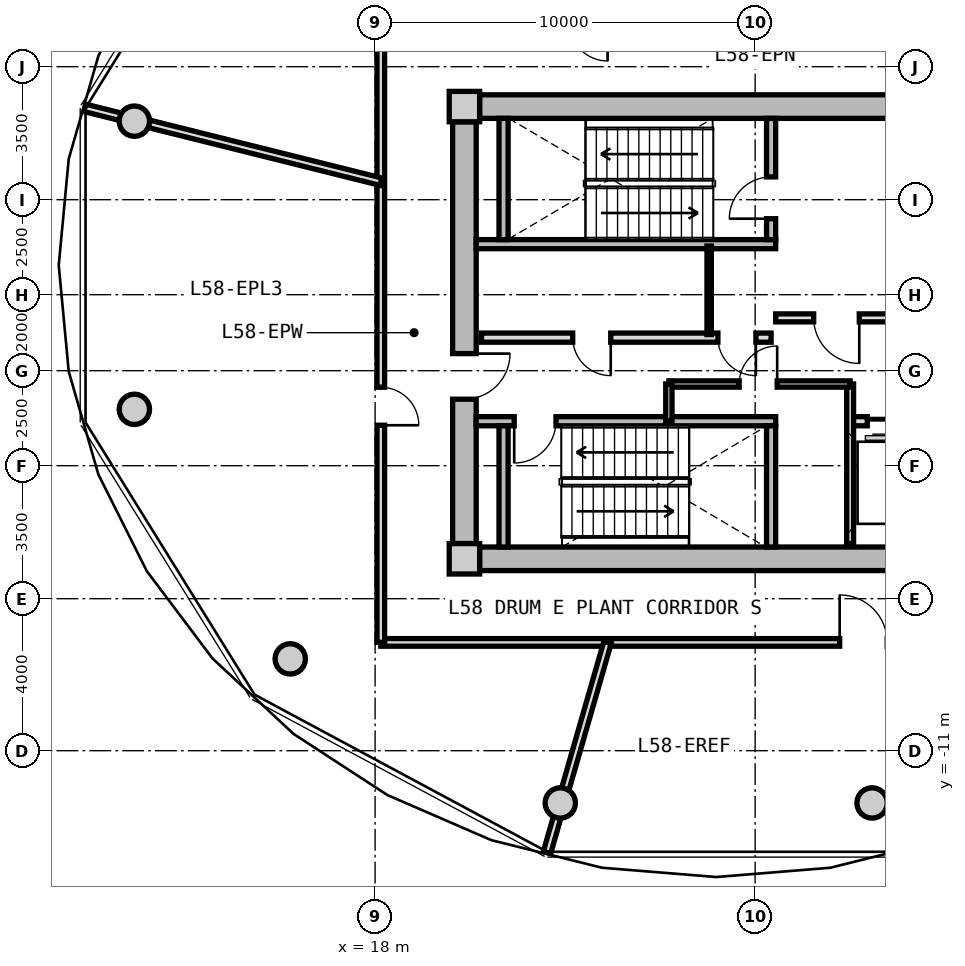
"""IFC4 building model, lengths in metres.
Left out: names, types, materials, properties, quantities, classifications, styles, units other than length and angle.
Written with IfcOpenShell. Run it as: python <this file> out.ifc"""

import sys

from ifc_helpers import new_model, si_unit, direction, frame, frame_2d, origin, origin_2d, place, context, subcontext, project, spatial, rectangle, circle, extrude, source, transform, mapped, element, fill, save


model = new_model("IFC4")
c1 = context("Model", 3, precision=1e-05, world=origin(), true_north=direction((0.0, 1.0)))
c2 = subcontext(c1, "Body", "Model", "MODEL_VIEW")
j1 = project(units=[si_unit("LENGTHUNIT", "METRE"), si_unit("PLANEANGLEUNIT", "RADIAN")], contexts=[c1])
p1 = place(None, origin())
s1 = spatial("IfcSite", under=j1, at=p1, CompositionType="ELEMENT")
p2 = place(p1, origin())
s2 = spatial("IfcBuilding", under=s1, at=p2, CompositionType="ELEMENT")
p3 = place(p2, frame((0.0, 0.0, 186.15)))
s3 = spatial("IfcBuildingStorey", under=s2, at=p3, CompositionType="ELEMENT", Elevation=186.15)
m1 = source(origin(), c2, "Body", "SweptSolid", [
    extrude(rectangle(XDim=0.8, YDim=0.8, at=origin_2d()), origin(), (0.0, 0.0, 1.0), 4.5),
])
for number, where, z_axis, x_axis in (
    (1, (20.35, -5.95, 0.0), (0.0, 0.0, 1.0), (1.0, 0.0, 0.0)),
    (2, (20.35, 5.95, 0.0), (0.0, 0.0, 1.0), (1.0, 0.0, 0.0)),
):
    element("IfcColumn", number, at=place(p3, frame(where, z_axis=z_axis, x_axis=x_axis)), inside=s3, PredefinedType="COLUMN", context=c2, shape_type="MappedRepresentation", body=[
        mapped(m1, transform((0.0, 0.0, 0.0), x_axis=(1.0, 0.0, 0.0), y_axis=(0.0, 1.0, 0.0), z_axis=(0.0, 0.0, 1.0), scale=1.0)),
    ])
m2 = source(origin(), c2, "Body", "SweptSolid", [
    extrude(rectangle(XDim=14.5, YDim=0.62, at=frame_2d((7.25, 0.0))), origin(), (0.0, 0.0, 1.0), 4.08),
])
for number, where, z_axis, x_axis in (
    (3, (20.75, 5.95, 0.0), (0.0, 0.0, 1.0), (1.0, 0.0, 0.0)),
    (4, (35.25, -5.95, 0.0), (0.0, 0.0, 1.0), (-1.0, 0.0, 0.0)),
):
    element("IfcWall", number, at=place(p3, frame(where, z_axis=z_axis, x_axis=x_axis)), inside=s3, PredefinedType="SHEAR", context=c2, shape_type="MappedRepresentation", body=[
        mapped(m2, transform((0.0, 0.0, 0.0), x_axis=(1.0, 0.0, 0.0), y_axis=(0.0, 1.0, 0.0), z_axis=(0.0, 0.0, 1.0), scale=1.0)),
    ])
m3 = source(origin(), c2, "Body", "SweptSolid", [
    extrude(rectangle(XDim=11.1, YDim=0.62, at=frame_2d((5.55, 0.0))), origin(), (0.0, 0.0, 1.0), 4.08),
])
p4 = place(p3, frame((20.35, -5.55, 0.0), z_axis=(0.0, 0.0, 1.0), x_axis=(0.0, 1.0, 0.0)))
e5 = element("IfcWall", 5, at=p4, inside=s3, PredefinedType="SHEAR", context=c2, shape_type="MappedRepresentation", body=[
    mapped(m3, transform((0.0, 0.0, 0.0), x_axis=(1.0, 0.0, 0.0), y_axis=(0.0, 1.0, 0.0), z_axis=(0.0, 0.0, 1.0), scale=1.0)),
])
p5 = place(p4, frame((3.8, 0.0, 0.0)))
e6 = element("IfcOpeningElement", 6, at=p5, cuts=e5, PredefinedType="OPENING", context=c2, shape_type="SweptSolid", body=[
    extrude(rectangle(XDim=1.2, YDim=2.15, at=frame_2d((0.6, 1.075))), frame((0.0, 0.32, 0.0), z_axis=(0.0, -1.0, 0.0), x_axis=(1.0, 0.0, 0.0)), (0.0, 0.0, 1.0), 0.64),
])
m4 = source(origin(), c2, "Body", "SweptSolid", [
    extrude(circle(Radius=0.4, at=origin_2d()), origin(), (0.0, 0.0, 1.0), 4.08),
])
for number, where, z_axis, x_axis in (
    (7, (11.665, 5.567, 0.0), (0.0, 0.0, 1.0), (1.0, 0.0, 0.0)),
    (8, (11.665, -2.016, 0.0), (0.0, 0.0, 1.0), (1.0, 0.0, 0.0)),
    (9, (15.767, -8.584, 0.0), (0.0, 0.0, 1.0), (1.0, 0.0, 0.0)),
    (10, (22.873, -12.375, 0.0), (0.0, 0.0, 1.0), (1.0, 0.0, 0.0)),
    (11, (31.077, -12.375, 0.0), (0.0, 0.0, 1.0), (1.0, 0.0, 0.0)),
):
    element("IfcColumn", number, at=place(p3, frame(where, z_axis=z_axis, x_axis=x_axis)), inside=s3, PredefinedType="COLUMN", context=c2, shape_type="MappedRepresentation", body=[
        mapped(m4, transform((0.0, 0.0, 0.0), x_axis=(1.0, 0.0, 0.0), y_axis=(0.0, 1.0, 0.0), z_axis=(0.0, 0.0, 1.0), scale=1.0)),
    ])
m5 = source(origin(), c2, "Body", "SweptSolid", [
    extrude(rectangle(XDim=7.88, YDim=0.24, at=frame_2d((3.94, 0.0))), origin(), (0.0, 0.0, 1.0), 4.08),
])
p6 = place(p3, frame((20.66, 2.33, 0.0), z_axis=(0.0, 0.0, 1.0), x_axis=(1.0, 0.0, 0.0)))
e12 = element("IfcWall", 12, at=p6, inside=s3, PredefinedType="PARTITIONING", context=c2, shape_type="MappedRepresentation", body=[
    mapped(m5, transform((0.0, 0.0, 0.0), x_axis=(1.0, 0.0, 0.0), y_axis=(0.0, 1.0, 0.0), z_axis=(0.0, 0.0, 1.0), scale=1.0)),
])
m6 = source(origin(), c2, "Body", "SweptSolid", [
    extrude(rectangle(XDim=3.19, YDim=0.24, at=frame_2d((1.595, 0.0))), origin(), (0.0, 0.0, 1.0), 4.08),
])
p7 = place(p3, frame((21.38, 2.45, 0.0), z_axis=(0.0, 0.0, 1.0), x_axis=(0.0, 1.0, 0.0)))
e13 = element("IfcWall", 13, at=p7, inside=s3, PredefinedType="PARTITIONING", context=c2, shape_type="MappedRepresentation", body=[
    mapped(m6, transform((0.0, 0.0, 0.0), x_axis=(1.0, 0.0, 0.0), y_axis=(0.0, 1.0, 0.0), z_axis=(0.0, 0.0, 1.0), scale=1.0)),
])
p8 = place(p3, frame((28.42, 2.45, 0.0), z_axis=(0.0, 0.0, 1.0), x_axis=(0.0, 1.0, 0.0)))
e14 = element("IfcWall", 14, at=p8, inside=s3, PredefinedType="PARTITIONING", context=c2, shape_type="MappedRepresentation", body=[
    mapped(m6, transform((0.0, 0.0, 0.0), x_axis=(1.0, 0.0, 0.0), y_axis=(0.0, 1.0, 0.0), z_axis=(0.0, 0.0, 1.0), scale=1.0)),
])
p9 = place(p8, frame((0.55, 0.0, 0.0)))
e15 = element("IfcOpeningElement", 15, at=p9, cuts=e14, PredefinedType="OPENING", context=c2, shape_type="SweptSolid", body=[
    extrude(rectangle(XDim=1.1, YDim=2.15, at=frame_2d((0.55, 1.075))), frame((0.0, 0.13, 0.0), z_axis=(0.0, -1.0, 0.0), x_axis=(1.0, 0.0, 0.0)), (0.0, 0.0, 1.0), 0.26),
])
p10 = place(p3, frame((20.66, -2.33, 0.0), z_axis=(0.0, 0.0, 1.0), x_axis=(1.0, 0.0, 0.0)))
e16 = element("IfcWall", 16, at=p10, inside=s3, PredefinedType="PARTITIONING", context=c2, shape_type="MappedRepresentation", body=[
    mapped(m5, transform((0.0, 0.0, 0.0), x_axis=(1.0, 0.0, 0.0), y_axis=(0.0, 1.0, 0.0), z_axis=(0.0, 0.0, 1.0), scale=1.0)),
])
p11 = place(p10, frame((1.0, 0.0, 0.0)))
e17 = element("IfcOpeningElement", 17, at=p11, cuts=e16, PredefinedType="OPENING", context=c2, shape_type="SweptSolid", body=[
    extrude(rectangle(XDim=1.1, YDim=2.15, at=frame_2d((0.55, 1.075))), frame((0.0, 0.13, 0.0), z_axis=(0.0, -1.0, 0.0), x_axis=(1.0, 0.0, 0.0)), (0.0, 0.0, 1.0), 0.26),
])
for number, where, z_axis, x_axis in (
    (18, (21.38, -5.64, 0.0), (0.0, 0.0, 1.0), (0.0, 1.0, 0.0)),
    (19, (28.42, -5.64, 0.0), (0.0, 0.0, 1.0), (0.0, 1.0, 0.0)),
):
    element("IfcWall", number, at=place(p3, frame(where, z_axis=z_axis, x_axis=x_axis)), inside=s3, PredefinedType="PARTITIONING", context=c2, shape_type="MappedRepresentation", body=[
        mapped(m6, transform((0.0, 0.0, 0.0), x_axis=(1.0, 0.0, 0.0), y_axis=(0.0, 1.0, 0.0), z_axis=(0.0, 0.0, 1.0), scale=1.0)),
    ])
m7 = source(origin(), c2, "Body", "SweptSolid", [
    extrude(rectangle(XDim=6.66, YDim=0.21, at=frame_2d((3.33, 0.0))), origin(), (0.0, 0.0, 1.0), 4.065),
])
p12 = place(p3, frame((28.54, 0.39, 0.0), z_axis=(0.0, 0.0, 1.0), x_axis=(1.0, 0.0, 0.0)))
e20 = element("IfcWall", 20, at=p12, inside=s3, PredefinedType="PARTITIONING", context=c2, shape_type="MappedRepresentation", body=[
    mapped(m7, transform((0.0, 0.0, 0.0), x_axis=(1.0, 0.0, 0.0), y_axis=(0.0, 1.0, 0.0), z_axis=(0.0, 0.0, 1.0), scale=1.0)),
])
p13 = place(p12, frame((1.0, 0.0, 0.0)))
e21 = element("IfcOpeningElement", 21, at=p13, cuts=e20, PredefinedType="OPENING", context=c2, shape_type="SweptSolid", body=[
    extrude(rectangle(XDim=1.2, YDim=2.15, at=frame_2d((0.6, 1.075))), frame((0.0, 0.115, 0.0), z_axis=(0.0, -1.0, 0.0), x_axis=(1.0, 0.0, 0.0)), (0.0, 0.0, 1.0), 0.23),
])
m8 = source(origin(), c2, "Body", "SweptSolid", [
    extrude(rectangle(XDim=7.62, YDim=0.24, at=frame_2d((3.81, 0.0))), origin(), (0.0, 0.0, 1.0), 4.065),
])
p14 = place(p3, frame((20.8, -0.13, 0.0), z_axis=(0.0, 0.0, 1.0), x_axis=(1.0, 0.0, 0.0)))
e22 = element("IfcWall", 22, at=p14, inside=s3, PredefinedType="PARTITIONING", context=c2, shape_type="MappedRepresentation", body=[
    mapped(m8, transform((0.0, 0.0, 0.0), x_axis=(1.0, 0.0, 0.0), y_axis=(0.0, 1.0, 0.0), z_axis=(0.0, 0.0, 1.0), scale=1.0)),
])
p15 = place(p14, frame((6.22, 0.0, 0.0)))
e23 = element("IfcOpeningElement", 23, at=p15, cuts=e22, PredefinedType="OPENING", context=c2, shape_type="SweptSolid", body=[
    extrude(rectangle(XDim=1.0, YDim=2.1, at=frame_2d((0.5, 1.05))), frame((0.0, 0.13, 0.0), z_axis=(0.0, -1.0, 0.0), x_axis=(1.0, 0.0, 0.0)), (0.0, 0.0, 1.0), 0.26),
])
p16 = place(p14, frame((2.4, 0.0, 0.0)))
e24 = element("IfcOpeningElement", 24, at=p16, cuts=e22, PredefinedType="OPENING", context=c2, shape_type="SweptSolid", body=[
    extrude(rectangle(XDim=1.0, YDim=2.1, at=frame_2d((0.5, 1.05))), frame((0.0, 0.13, 0.0), z_axis=(0.0, -1.0, 0.0), x_axis=(1.0, 0.0, 0.0)), (0.0, 0.0, 1.0), 0.26),
])
m9 = source(origin(), c2, "Body", "SweptSolid", [
    extrude(rectangle(XDim=2.33, YDim=0.115, at=frame_2d((1.165, 0.0))), origin(), (0.0, 0.0, 1.0), 4.065),
])
p17 = place(p3, frame((26.79, -0.05, 0.0), z_axis=(0.0, 0.0, 1.0), x_axis=(0.0, 1.0, 0.0)))
e25 = element("IfcWall", 25, at=p17, inside=s3, PredefinedType="PARTITIONING", context=c2, shape_type="MappedRepresentation", body=[
    mapped(m9, transform((0.0, 0.0, 0.0), x_axis=(1.0, 0.0, 0.0), y_axis=(0.0, 1.0, 0.0), z_axis=(0.0, 0.0, 1.0), scale=1.0)),
])
m10 = source(origin(), c2, "Body", "SweptSolid", [
    extrude(rectangle(XDim=2.05, YDim=0.24, at=frame_2d((1.025, 0.0))), origin(), (0.0, 0.0, 1.0), 4.065),
])
p18 = place(p3, frame((30.5, -2.33, 0.0), z_axis=(0.0, 0.0, 1.0), x_axis=(1.0, 0.0, 0.0)))
e26 = element("IfcWall", 26, at=p18, inside=s3, PredefinedType="PARTITIONING", context=c2, shape_type="MappedRepresentation", body=[
    mapped(m10, transform((0.0, 0.0, 0.0), x_axis=(1.0, 0.0, 0.0), y_axis=(0.0, 1.0, 0.0), z_axis=(0.0, 0.0, 1.0), scale=1.0)),
])
p19 = place(p18, frame((0.45, 0.0, 0.0)))
e27 = element("IfcOpeningElement", 27, at=p19, cuts=e26, PredefinedType="OPENING", context=c2, shape_type="SweptSolid", body=[
    extrude(rectangle(XDim=1.1, YDim=2.2, at=frame_2d((0.55, 1.1))), frame((0.0, 0.13, 0.0), z_axis=(0.0, -1.0, 0.0), x_axis=(1.0, 0.0, 0.0)), (0.0, 0.0, 1.0), 0.26),
])
m11 = source(origin(), c2, "Body", "SweptSolid", [
    extrude(rectangle(XDim=4.2, YDim=0.18, at=frame_2d((2.1, 0.0))), origin(), (0.0, 0.0, 1.0), 4.065),
])
p20 = place(p3, frame((30.5, -5.55, 0.0), z_axis=(0.0, 0.0, 1.0), x_axis=(0.0, 1.0, 0.0)))
e28 = element("IfcWall", 28, at=p20, inside=s3, PredefinedType="PARTITIONING", context=c2, shape_type="MappedRepresentation", body=[
    mapped(m11, transform((0.0, 0.0, 0.0), x_axis=(1.0, 0.0, 0.0), y_axis=(0.0, 1.0, 0.0), z_axis=(0.0, 0.0, 1.0), scale=1.0)),
])
m12 = source(origin(), c2, "Body", "SweptSolid", [
    extrude(rectangle(XDim=4.77, YDim=0.165, at=frame_2d((2.385, 0.0))), origin(), (0.0, 0.0, 1.0), 4.065),
])
p21 = place(p3, frame((25.73, -1.35, 0.0), z_axis=(0.0, 0.0, 1.0), x_axis=(1.0, 0.0, 0.0)))
e29 = element("IfcWall", 29, at=p21, inside=s3, PredefinedType="PARTITIONING", context=c2, shape_type="MappedRepresentation", body=[
    mapped(m12, transform((0.0, 0.0, 0.0), x_axis=(1.0, 0.0, 0.0), y_axis=(0.0, 1.0, 0.0), z_axis=(0.0, 0.0, 1.0), scale=1.0)),
])
p22 = place(p21, frame((1.85, 0.0, 0.0)))
e30 = element("IfcOpeningElement", 30, at=p22, cuts=e29, PredefinedType="OPENING", context=c2, shape_type="SweptSolid", body=[
    extrude(rectangle(XDim=1.0, YDim=2.1, at=frame_2d((0.5, 1.05))), frame((0.0, 0.093, 0.0), z_axis=(0.0, -1.0, 0.0), x_axis=(1.0, 0.0, 0.0)), (0.0, 0.0, 1.0), 0.185),
])
m13 = source(origin(), c2, "Body", "SweptSolid", [
    extrude(rectangle(XDim=0.98, YDim=0.165, at=frame_2d((0.49, 0.0))), origin(), (0.0, 0.0, 1.0), 4.065),
])
p23 = place(p3, frame((25.73, -2.33, 0.0), z_axis=(0.0, 0.0, 1.0), x_axis=(0.0, 1.0, 0.0)))
e31 = element("IfcWall", 31, at=p23, inside=s3, PredefinedType="PARTITIONING", context=c2, shape_type="MappedRepresentation", body=[
    mapped(m13, transform((0.0, 0.0, 0.0), x_axis=(1.0, 0.0, 0.0), y_axis=(0.0, 1.0, 0.0), z_axis=(0.0, 0.0, 1.0), scale=1.0)),
])
m14 = source(origin(), c2, "Body", "SweptSolid", [
    extrude(rectangle(XDim=19.7, YDim=0.2, at=frame_2d((9.85, 0.0))), origin(), (0.0, 0.0, 1.0), 4.065),
])
p24 = place(p3, frame((37.85, -8.15, 0.0), z_axis=(0.0, 0.0, 1.0), x_axis=(-1.0, 0.0, 0.0)))
e32 = element("IfcWall", 32, at=p24, inside=s3, PredefinedType="PARTITIONING", context=c2, shape_type="MappedRepresentation", body=[
    mapped(m14, transform((0.0, 0.0, 0.0), x_axis=(1.0, 0.0, 0.0), y_axis=(0.0, 1.0, 0.0), z_axis=(0.0, 0.0, 1.0), scale=1.0)),
])
p25 = place(p24, frame((6.375, 0.0, 0.0)))
e33 = element("IfcOpeningElement", 33, at=p25, cuts=e32, PredefinedType="OPENING", context=c2, shape_type="SweptSolid", body=[
    extrude(rectangle(XDim=1.25, YDim=2.2, at=frame_2d((0.625, 1.1))), frame((0.0, 0.11, 0.0), z_axis=(0.0, -1.0, 0.0), x_axis=(1.0, 0.0, 0.0)), (0.0, 0.0, 1.0), 0.22),
])
m15 = source(origin(), c2, "Body", "SweptSolid", [
    extrude(rectangle(XDim=16.3, YDim=0.2, at=frame_2d((8.15, 0.0))), origin(), (0.0, 0.0, 1.0), 4.065),
])
p26 = place(p3, frame((18.15, -8.15, 0.0), z_axis=(0.0, 0.0, 1.0), x_axis=(0.0, 1.0, 0.0)))
e34 = element("IfcWall", 34, at=p26, inside=s3, PredefinedType="PARTITIONING", context=c2, shape_type="MappedRepresentation", body=[
    mapped(m15, transform((0.0, 0.0, 0.0), x_axis=(1.0, 0.0, 0.0), y_axis=(0.0, 1.0, 0.0), z_axis=(0.0, 0.0, 1.0), scale=1.0)),
])
p27 = place(p26, frame((5.715, 0.0, 0.0)))
e35 = element("IfcOpeningElement", 35, at=p27, cuts=e34, PredefinedType="OPENING", context=c2, shape_type="SweptSolid", body=[
    extrude(rectangle(XDim=1.0, YDim=2.1, at=frame_2d((0.5, 1.05))), frame((0.0, 0.11, 0.0), z_axis=(0.0, -1.0, 0.0), x_axis=(1.0, 0.0, 0.0)), (0.0, 0.0, 1.0), 0.22),
])
m16 = source(origin(), c2, "Body", "SweptSolid", [
    extrude(rectangle(XDim=5.754, YDim=0.2, at=frame_2d((2.877, 0.0))), origin(), (0.0, 0.0, 1.0), 4.065),
])
p28 = place(p3, frame((24.116, -8.15, 0.0), z_axis=(0.0, 0.0, 1.0), x_axis=(-0.276793809121, -0.960929335192, 0.0)))
e36 = element("IfcWall", 36, at=p28, inside=s3, PredefinedType="PARTITIONING", context=c2, shape_type="MappedRepresentation", body=[
    mapped(m16, transform((0.0, 0.0, 0.0), x_axis=(1.0, 0.0, 0.0), y_axis=(0.0, 1.0, 0.0), z_axis=(0.0, 0.0, 1.0), scale=1.0)),
])
m17 = source(origin(), c2, "Body", "SweptSolid", [
    extrude(rectangle(XDim=8.027, YDim=0.2, at=frame_2d((4.014, 0.0))), origin(), (0.0, 0.0, 1.0), 4.065),
])
p29 = place(p3, frame((18.15, 3.975, 0.0), z_axis=(0.0, 0.0, 1.0), x_axis=(-0.970312225041, 0.241855713053, 0.0)))
e37 = element("IfcWall", 37, at=p29, inside=s3, PredefinedType="PARTITIONING", context=c2, shape_type="MappedRepresentation", body=[
    mapped(m17, transform((0.0, 0.0, 0.0), x_axis=(1.0, 0.0, 0.0), y_axis=(0.0, 1.0, 0.0), z_axis=(0.0, 0.0, 1.0), scale=1.0)),
])
m18 = source(origin(), c2, "Body", "SweptSolid", [
    extrude(rectangle(XDim=1.1, YDim=2.15, at=frame_2d((0.55, 1.075))), frame((0.0, 0.025, 0.0), z_axis=(0.0, -1.0, 0.0), x_axis=(1.0, 0.0, 0.0)), (0.0, 0.0, 1.0), 0.05),
])
p30 = place(p9, origin())
e38 = element("IfcDoor", 38, at=p30, inside=s3, OperationType="SINGLE_SWING_LEFT", PredefinedType="DOOR", context=c2, shape_type="MappedRepresentation", body=[
    mapped(m18, transform((0.0, 0.0, 0.0), x_axis=(1.0, 0.0, 0.0), y_axis=(0.0, 1.0, 0.0), z_axis=(0.0, 0.0, 1.0), scale=1.0)),
])
fill(e15, e38)
p31 = place(p11, frame((1.1, 0.0, 0.0), z_axis=(0.0, 0.0, 1.0), x_axis=(-1.0, 0.0, 0.0)))
e39 = element("IfcDoor", 39, at=p31, inside=s3, OperationType="SINGLE_SWING_RIGHT", PredefinedType="DOOR", context=c2, shape_type="MappedRepresentation", body=[
    mapped(m18, transform((0.0, 0.0, 0.0), x_axis=(1.0, 0.0, 0.0), y_axis=(0.0, 1.0, 0.0), z_axis=(0.0, 0.0, 1.0), scale=1.0)),
])
fill(e17, e39)
m19 = source(origin(), c2, "Body", "SweptSolid", [
    extrude(rectangle(XDim=1.2, YDim=2.15, at=frame_2d((0.6, 1.075))), frame((0.0, 0.025, 0.0), z_axis=(0.0, -1.0, 0.0), x_axis=(1.0, 0.0, 0.0)), (0.0, 0.0, 1.0), 0.05),
])
p32 = place(p13, frame((1.2, 0.0, 0.0), z_axis=(0.0, 0.0, 1.0), x_axis=(-1.0, 0.0, 0.0)))
e40 = element("IfcDoor", 40, at=p32, inside=s3, OperationType="SINGLE_SWING_LEFT", PredefinedType="DOOR", context=c2, shape_type="MappedRepresentation", body=[
    mapped(m19, transform((0.0, 0.0, 0.0), x_axis=(1.0, 0.0, 0.0), y_axis=(0.0, 1.0, 0.0), z_axis=(0.0, 0.0, 1.0), scale=1.0)),
])
fill(e21, e40)
p33 = place(p5, frame((1.2, 0.0, 0.0), z_axis=(0.0, 0.0, 1.0), x_axis=(-1.0, 0.0, 0.0)))
e41 = element("IfcDoor", 41, at=p33, inside=s3, OperationType="SINGLE_SWING_LEFT", PredefinedType="DOOR", context=c2, shape_type="MappedRepresentation", body=[
    mapped(m19, transform((0.0, 0.0, 0.0), x_axis=(1.0, 0.0, 0.0), y_axis=(0.0, 1.0, 0.0), z_axis=(0.0, 0.0, 1.0), scale=1.0)),
])
fill(e6, e41)
m20 = source(origin(), c2, "Body", "SweptSolid", [
    extrude(rectangle(XDim=1.0, YDim=2.1, at=frame_2d((0.5, 1.05))), frame((0.0, 0.025, 0.0), z_axis=(0.0, -1.0, 0.0), x_axis=(1.0, 0.0, 0.0)), (0.0, 0.0, 1.0), 0.05),
])
p34 = place(p15, frame((1.0, 0.0, 0.0), z_axis=(0.0, 0.0, 1.0), x_axis=(-1.0, 0.0, 0.0)))
e42 = element("IfcDoor", 42, at=p34, inside=s3, OperationType="SINGLE_SWING_LEFT", PredefinedType="DOOR", context=c2, shape_type="MappedRepresentation", body=[
    mapped(m20, transform((0.0, 0.0, 0.0), x_axis=(1.0, 0.0, 0.0), y_axis=(0.0, 1.0, 0.0), z_axis=(0.0, 0.0, 1.0), scale=1.0)),
])
fill(e23, e42)
p35 = place(p16, frame((1.0, 0.0, 0.0), z_axis=(0.0, 0.0, 1.0), x_axis=(-1.0, 0.0, 0.0)))
e43 = element("IfcDoor", 43, at=p35, inside=s3, OperationType="SINGLE_SWING_LEFT", PredefinedType="DOOR", context=c2, shape_type="MappedRepresentation", body=[
    mapped(m20, transform((0.0, 0.0, 0.0), x_axis=(1.0, 0.0, 0.0), y_axis=(0.0, 1.0, 0.0), z_axis=(0.0, 0.0, 1.0), scale=1.0)),
])
fill(e24, e43)
m21 = source(origin(), c2, "Body", "SweptSolid", [
    extrude(rectangle(XDim=1.1, YDim=2.2, at=frame_2d((0.55, 1.1))), frame((0.0, 0.025, 0.0), z_axis=(0.0, -1.0, 0.0), x_axis=(1.0, 0.0, 0.0)), (0.0, 0.0, 1.0), 0.05),
])
p36 = place(p19, frame((1.1, 0.0, 0.0), z_axis=(0.0, 0.0, 1.0), x_axis=(-1.0, 0.0, 0.0)))
e44 = element("IfcDoor", 44, at=p36, inside=s3, OperationType="SLIDING_TO_RIGHT", PredefinedType="DOOR", context=c2, shape_type="MappedRepresentation", body=[
    mapped(m21, transform((0.0, 0.0, 0.0), x_axis=(1.0, 0.0, 0.0), y_axis=(0.0, 1.0, 0.0), z_axis=(0.0, 0.0, 1.0), scale=1.0)),
])
fill(e27, e44)
p37 = place(p22, origin())
e45 = element("IfcDoor", 45, at=p37, inside=s3, OperationType="SINGLE_SWING_RIGHT", PredefinedType="DOOR", context=c2, shape_type="MappedRepresentation", body=[
    mapped(m20, transform((0.0, 0.0, 0.0), x_axis=(1.0, 0.0, 0.0), y_axis=(0.0, 1.0, 0.0), z_axis=(0.0, 0.0, 1.0), scale=1.0)),
])
fill(e30, e45)
m22 = source(origin(), c2, "Body", "SweptSolid", [
    extrude(rectangle(XDim=1.25, YDim=2.2, at=frame_2d((0.625, 1.1))), frame((0.0, 0.025, 0.0), z_axis=(0.0, -1.0, 0.0), x_axis=(1.0, 0.0, 0.0)), (0.0, 0.0, 1.0), 0.05),
])
p38 = place(p25, frame((1.25, 0.0, 0.0), z_axis=(0.0, 0.0, 1.0), x_axis=(-1.0, 0.0, 0.0)))
e46 = element("IfcDoor", 46, at=p38, inside=s3, OperationType="SINGLE_SWING_LEFT", PredefinedType="DOOR", context=c2, shape_type="MappedRepresentation", body=[
    mapped(m22, transform((0.0, 0.0, 0.0), x_axis=(1.0, 0.0, 0.0), y_axis=(0.0, 1.0, 0.0), z_axis=(0.0, 0.0, 1.0), scale=1.0)),
])
fill(e33, e46)
p39 = place(p27, frame((1.0, 0.0, 0.0), z_axis=(0.0, 0.0, 1.0), x_axis=(-1.0, 0.0, 0.0)))
e47 = element("IfcDoor", 47, at=p39, inside=s3, OperationType="SINGLE_SWING_RIGHT", PredefinedType="DOOR", context=c2, shape_type="MappedRepresentation", body=[
    mapped(m20, transform((0.0, 0.0, 0.0), x_axis=(1.0, 0.0, 0.0), y_axis=(0.0, 1.0, 0.0), z_axis=(0.0, 0.0, 1.0), scale=1.0)),
])
fill(e35, e47)
save(model, sys.argv[1])
